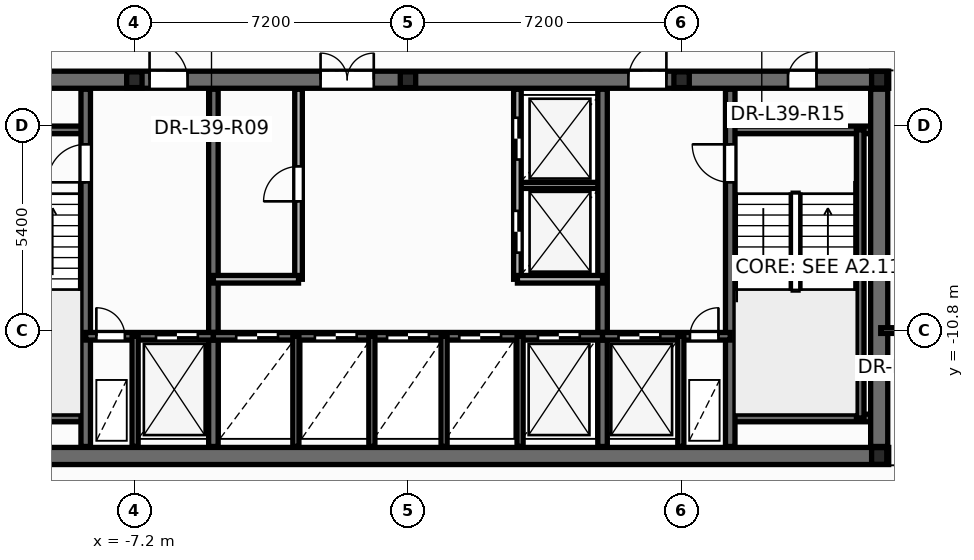
"""IFC4 building model, lengths in metres.
Left out: names, types, materials, properties, quantities, classifications, styles, units other than length and angle.
Written with IfcOpenShell. Run it as: python <this file> out.ifc"""

import sys

from ifc_helpers import new_model, si_unit, direction, frame, frame_2d, origin, origin_2d, place, context, subcontext, project, spatial, rectangle, i_section, extrude, element, fill, save


model = new_model("IFC4")
c1 = context("Model", 3, precision=1e-05, world=origin(), true_north=direction((0.0, 1.0)))
c2 = subcontext(c1, "Body", "Model", "MODEL_VIEW")
j1 = project(units=[si_unit("LENGTHUNIT", "METRE"), si_unit("PLANEANGLEUNIT", "RADIAN")], contexts=[c1])
p1 = place(None, origin())
s1 = spatial("IfcSite", under=j1, at=p1, CompositionType="ELEMENT")
p2 = place(p1, origin())
s2 = spatial("IfcBuilding", under=s1, at=p2, CompositionType="ELEMENT")
p3 = place(p2, frame((0.0, 0.0, 150.9)))
s3 = spatial("IfcBuildingStorey", under=s2, at=p3, CompositionType="ELEMENT", Elevation=150.9)
for number, where, z_axis, x_axis in (
    (1, (12.4, -14.1, 0.0), (0.0, 0.0, 1.0), (1.0, 0.0, 0.0)),
    (2, (12.4, -4.2, 0.0), (0.0, 0.0, 1.0), (1.0, 0.0, 0.0)),
):
    element("IfcColumn", number, at=place(p3, frame(where, z_axis=z_axis, x_axis=x_axis)), inside=s3, PredefinedType="COLUMN", context=c2, shape_type="SweptSolid", body=[
        extrude(i_section(OverallWidth=0.4, OverallDepth=0.44, WebThickness=0.028, FlangeThickness=0.04, at=origin_2d()), origin(), (0.0, 0.0, 1.0), 3.6),
    ])
for number, where, z_axis, x_axis in (
    (3, (-7.2, -4.2, 0.0), (0.0, 0.0, 1.0), (1.0, 0.0, 0.0)),
    (4, (0.0, -4.2, 0.0), (0.0, 0.0, 1.0), (1.0, 0.0, 0.0)),
    (5, (7.2, -4.2, 0.0), (0.0, 0.0, 1.0), (1.0, 0.0, 0.0)),
):
    element("IfcColumn", number, at=place(p3, frame(where, z_axis=z_axis, x_axis=x_axis)), inside=s3, PredefinedType="PILASTER", context=c2, shape_type="SweptSolid", body=[
        extrude(i_section(OverallWidth=0.405, OverallDepth=0.414, WebThickness=0.022, FlangeThickness=0.032, at=origin_2d()), origin(), (0.0, 0.0, 1.0), 3.6),
    ])
p4 = place(p3, frame((2.88, -6.98, 0.0), z_axis=(0.0, 0.0, 1.0), x_axis=(1.0, 0.0, 0.0)))
e6 = element("IfcWall", 6, at=p4, inside=s3, PredefinedType="PARTITIONING", context=c2, shape_type="SweptSolid", body=[
    extrude(rectangle(XDim=2.24, YDim=0.16, at=frame_2d((1.12, 0.0))), origin(), (0.0, 0.0, 1.0), 3.35),
])
p5 = place(p3, frame((-12.65, -14.1, 0.0), z_axis=(0.0, 0.0, 1.0), x_axis=(1.0, 0.0, 0.0)))
e7 = element("IfcWall", 7, at=p5, inside=s3, PredefinedType="SHEAR", context=c2, shape_type="SweptSolid", body=[
    extrude(rectangle(XDim=25.3, YDim=0.45, at=frame_2d((12.65, 0.0))), origin(), (0.0, 0.0, 1.0), 3.6),
])
p6 = place(p3, frame((-12.65, -4.2, 0.0), z_axis=(0.0, 0.0, 1.0), x_axis=(1.0, 0.0, 0.0)))
e8 = element("IfcWall", 8, at=p6, inside=s3, PredefinedType="SHEAR", context=c2, shape_type="SweptSolid", body=[
    extrude(rectangle(XDim=25.3, YDim=0.45, at=frame_2d((12.65, 0.0))), origin(), (0.0, 0.0, 1.0), 3.6),
])
p7 = place(p6, frame((1.85, 0.0, 0.0)))
e9 = element("IfcOpeningElement", 9, at=p7, cuts=e8, PredefinedType="OPENING", context=c2, shape_type="SweptSolid", body=[
    extrude(rectangle(XDim=0.756, YDim=2.054, at=frame_2d((0.375, 1.027))), frame((0.0, 0.235, 0.0), z_axis=(0.0, -1.0, 0.0), x_axis=(1.0, 0.0, 0.0)), (0.0, 0.0, 1.0), 0.47),
])
p8 = place(p6, frame((22.65, 0.0, 0.0)))
e10 = element("IfcOpeningElement", 10, at=p8, cuts=e8, PredefinedType="OPENING", context=c2, shape_type="SweptSolid", body=[
    extrude(rectangle(XDim=0.756, YDim=2.054, at=frame_2d((0.375, 1.027))), frame((0.0, 0.235, 0.0), z_axis=(0.0, -1.0, 0.0), x_axis=(1.0, 0.0, 0.0)), (0.0, 0.0, 1.0), 0.47),
])
p9 = place(p6, frame((5.85, 0.0, 0.0)))
e11 = element("IfcOpeningElement", 11, at=p9, cuts=e8, PredefinedType="OPENING", context=c2, shape_type="SweptSolid", body=[
    extrude(rectangle(XDim=1.006, YDim=2.104, at=frame_2d((0.5, 1.052))), frame((0.0, 0.235, 0.0), z_axis=(0.0, -1.0, 0.0), x_axis=(1.0, 0.0, 0.0)), (0.0, 0.0, 1.0), 0.47),
])
p10 = place(p6, frame((10.35, 0.0, 0.0)))
e12 = element("IfcOpeningElement", 12, at=p10, cuts=e8, PredefinedType="OPENING", context=c2, shape_type="SweptSolid", body=[
    extrude(rectangle(XDim=1.406, YDim=2.154, at=frame_2d((0.7, 1.077))), frame((0.0, 0.235, 0.0), z_axis=(0.0, -1.0, 0.0), x_axis=(1.0, 0.0, 0.0)), (0.0, 0.0, 1.0), 0.47),
])
p11 = place(p6, frame((18.45, 0.0, 0.0)))
e13 = element("IfcOpeningElement", 13, at=p11, cuts=e8, PredefinedType="OPENING", context=c2, shape_type="SweptSolid", body=[
    extrude(rectangle(XDim=1.006, YDim=2.104, at=frame_2d((0.5, 1.052))), frame((0.0, 0.235, 0.0), z_axis=(0.0, -1.0, 0.0), x_axis=(1.0, 0.0, 0.0)), (0.0, 0.0, 1.0), 0.47),
])
for number, where, z_axis, x_axis in (
    (14, (-12.35, -5.52, 0.0), (0.0, 0.0, 1.0), (1.0, 0.0, 0.0)),
    (15, (-12.35, -13.1, 0.0), (0.0, 0.0, 1.0), (1.0, 0.0, 0.0)),
    (16, (8.48, -5.52, 0.0), (0.0, 0.0, 1.0), (1.0, 0.0, 0.0)),
    (17, (8.48, -13.1, 0.0), (0.0, 0.0, 1.0), (1.0, 0.0, 0.0)),
):
    element("IfcWall", number, at=place(p3, frame(where, z_axis=z_axis, x_axis=x_axis)), inside=s3, PredefinedType="SOLIDWALL", context=c2, shape_type="SweptSolid", body=[
        extrude(rectangle(XDim=3.87, YDim=0.2, at=frame_2d((1.935, 0.0))), origin(), (0.0, 0.0, 1.0), 3.6),
    ])
p12 = place(p3, frame((11.9, -13.1, 0.0), z_axis=(0.0, 0.0, 1.0), x_axis=(0.0, 1.0, 0.0)))
e18 = element("IfcWall", 18, at=p12, inside=s3, PredefinedType="SOLIDWALL", context=c2, shape_type="SweptSolid", body=[
    extrude(rectangle(XDim=7.58, YDim=0.2, at=frame_2d((3.79, 0.0))), origin(), (0.0, 0.0, 1.0), 3.6),
])
p13 = place(p3, frame((-8.48, -13.85, 0.0), z_axis=(0.0, 0.0, 1.0), x_axis=(0.0, 1.0, 0.0)))
e19 = element("IfcWall", 19, at=p13, inside=s3, PredefinedType="SHEAR", context=c2, shape_type="SweptSolid", body=[
    extrude(rectangle(XDim=9.4, YDim=0.25, at=frame_2d((4.7, 0.0))), origin(), (0.0, 0.0, 1.0), 3.6),
])
p14 = place(p13, frame((6.95, 0.0, 0.0)))
e20 = element("IfcOpeningElement", 20, at=p14, cuts=e19, PredefinedType="OPENING", context=c2, shape_type="SweptSolid", body=[
    extrude(rectangle(XDim=1.006, YDim=2.104, at=frame_2d((0.5, 1.052))), frame((0.0, 0.135, 0.0), z_axis=(0.0, -1.0, 0.0), x_axis=(1.0, 0.0, 0.0)), (0.0, 0.0, 1.0), 0.27),
])
p15 = place(p3, frame((8.48, -13.85, 0.0), z_axis=(0.0, 0.0, 1.0), x_axis=(0.0, 1.0, 0.0)))
e21 = element("IfcWall", 21, at=p15, inside=s3, PredefinedType="SHEAR", context=c2, shape_type="SweptSolid", body=[
    extrude(rectangle(XDim=9.4, YDim=0.25, at=frame_2d((4.7, 0.0))), origin(), (0.0, 0.0, 1.0), 3.6),
])
p16 = place(p15, frame((6.95, 0.0, 0.0)))
e22 = element("IfcOpeningElement", 22, at=p16, cuts=e21, PredefinedType="OPENING", context=c2, shape_type="SweptSolid", body=[
    extrude(rectangle(XDim=1.006, YDim=2.104, at=frame_2d((0.5, 1.052))), frame((0.0, 0.135, 0.0), z_axis=(0.0, -1.0, 0.0), x_axis=(1.0, 0.0, 0.0)), (0.0, 0.0, 1.0), 0.27),
])
for number, where, z_axis, x_axis in (
    (23, (-5.12, -13.85, 0.0), (0.0, 0.0, 1.0), (0.0, 1.0, 0.0)),
    (24, (5.12, -13.85, 0.0), (0.0, 0.0, 1.0), (0.0, 1.0, 0.0)),
):
    element("IfcWall", number, at=place(p3, frame(where, z_axis=z_axis, x_axis=x_axis)), inside=s3, PredefinedType="SHEAR", context=c2, shape_type="SweptSolid", body=[
        extrude(rectangle(XDim=9.4, YDim=0.25, at=frame_2d((4.7, 0.0))), origin(), (0.0, 0.0, 1.0), 3.6),
    ])
p17 = place(p3, frame((-8.48, -10.95, 0.0), z_axis=(0.0, 0.0, 1.0), x_axis=(1.0, 0.0, 0.0)))
e25 = element("IfcWall", 25, at=p17, inside=s3, PredefinedType="SOLIDWALL", context=c2, shape_type="SweptSolid", body=[
    extrude(rectangle(XDim=3.36, YDim=0.2, at=frame_2d((1.68, 0.0))), origin(), (0.0, 0.0, 1.0), 3.6),
])
p18 = place(p17, frame((0.28, 0.0, 0.0)))
e26 = element("IfcOpeningElement", 26, at=p18, cuts=e25, PredefinedType="OPENING", context=c2, shape_type="SweptSolid", body=[
    extrude(rectangle(XDim=0.756, YDim=2.054, at=frame_2d((0.375, 1.027))), frame((0.0, 0.11, 0.0), z_axis=(0.0, -1.0, 0.0), x_axis=(1.0, 0.0, 0.0)), (0.0, 0.0, 1.0), 0.22),
])
p19 = place(p17, frame((1.85, 0.0, 0.0)))
e27 = element("IfcOpeningElement", 27, at=p19, cuts=e25, PredefinedType="OPENING", context=c2, shape_type="SweptSolid", body=[
    extrude(rectangle(XDim=1.106, YDim=2.104, at=frame_2d((0.55, 1.052))), frame((0.0, 0.11, 0.0), z_axis=(0.0, -1.0, 0.0), x_axis=(1.0, 0.0, 0.0)), (0.0, 0.0, 1.0), 0.22),
])
p20 = place(p3, frame((-5.12, -10.95, 0.0), z_axis=(0.0, 0.0, 1.0), x_axis=(1.0, 0.0, 0.0)))
e28 = element("IfcWall", 28, at=p20, inside=s3, PredefinedType="SOLIDWALL", context=c2, shape_type="SweptSolid", body=[
    extrude(rectangle(XDim=10.24, YDim=0.2, at=frame_2d((5.12, 0.0))), origin(), (0.0, 0.0, 1.0), 3.6),
])
p21 = place(p20, frame((0.6, 0.0, 0.0)))
e29 = element("IfcOpeningElement", 29, at=p21, cuts=e28, PredefinedType="OPENING", context=c2, shape_type="SweptSolid", body=[
    extrude(rectangle(XDim=1.106, YDim=2.104, at=frame_2d((0.55, 1.052))), frame((0.0, 0.11, 0.0), z_axis=(0.0, -1.0, 0.0), x_axis=(1.0, 0.0, 0.0)), (0.0, 0.0, 1.0), 0.22),
])
p22 = place(p20, frame((2.67, 0.0, 0.0)))
e30 = element("IfcOpeningElement", 30, at=p22, cuts=e28, PredefinedType="OPENING", context=c2, shape_type="SweptSolid", body=[
    extrude(rectangle(XDim=1.106, YDim=2.104, at=frame_2d((0.55, 1.052))), frame((0.0, 0.11, 0.0), z_axis=(0.0, -1.0, 0.0), x_axis=(1.0, 0.0, 0.0)), (0.0, 0.0, 1.0), 0.22),
])
p23 = place(p20, frame((4.57, 0.0, 0.0)))
e31 = element("IfcOpeningElement", 31, at=p23, cuts=e28, PredefinedType="OPENING", context=c2, shape_type="SweptSolid", body=[
    extrude(rectangle(XDim=1.106, YDim=2.104, at=frame_2d((0.55, 1.052))), frame((0.0, 0.11, 0.0), z_axis=(0.0, -1.0, 0.0), x_axis=(1.0, 0.0, 0.0)), (0.0, 0.0, 1.0), 0.22),
])
p24 = place(p20, frame((6.47, 0.0, 0.0)))
e32 = element("IfcOpeningElement", 32, at=p24, cuts=e28, PredefinedType="OPENING", context=c2, shape_type="SweptSolid", body=[
    extrude(rectangle(XDim=1.106, YDim=2.104, at=frame_2d((0.55, 1.052))), frame((0.0, 0.11, 0.0), z_axis=(0.0, -1.0, 0.0), x_axis=(1.0, 0.0, 0.0)), (0.0, 0.0, 1.0), 0.22),
])
p25 = place(p20, frame((8.54, 0.0, 0.0)))
e33 = element("IfcOpeningElement", 33, at=p25, cuts=e28, PredefinedType="OPENING", context=c2, shape_type="SweptSolid", body=[
    extrude(rectangle(XDim=1.106, YDim=2.104, at=frame_2d((0.55, 1.052))), frame((0.0, 0.11, 0.0), z_axis=(0.0, -1.0, 0.0), x_axis=(1.0, 0.0, 0.0)), (0.0, 0.0, 1.0), 0.22),
])
p26 = place(p3, frame((5.12, -10.95, 0.0), z_axis=(0.0, 0.0, 1.0), x_axis=(1.0, 0.0, 0.0)))
e34 = element("IfcWall", 34, at=p26, inside=s3, PredefinedType="SOLIDWALL", context=c2, shape_type="SweptSolid", body=[
    extrude(rectangle(XDim=3.36, YDim=0.2, at=frame_2d((1.68, 0.0))), origin(), (0.0, 0.0, 1.0), 3.6),
])
p27 = place(p26, frame((0.42, 0.0, 0.0)))
e35 = element("IfcOpeningElement", 35, at=p27, cuts=e34, PredefinedType="OPENING", context=c2, shape_type="SweptSolid", body=[
    extrude(rectangle(XDim=1.106, YDim=2.104, at=frame_2d((0.55, 1.052))), frame((0.0, 0.11, 0.0), z_axis=(0.0, -1.0, 0.0), x_axis=(1.0, 0.0, 0.0)), (0.0, 0.0, 1.0), 0.22),
])
p28 = place(p26, frame((2.3, 0.0, 0.0)))
e36 = element("IfcOpeningElement", 36, at=p28, cuts=e34, PredefinedType="OPENING", context=c2, shape_type="SweptSolid", body=[
    extrude(rectangle(XDim=0.756, YDim=2.054, at=frame_2d((0.375, 1.027))), frame((0.0, 0.11, 0.0), z_axis=(0.0, -1.0, 0.0), x_axis=(1.0, 0.0, 0.0)), (0.0, 0.0, 1.0), 0.22),
])
for number, where, z_axis, x_axis in (
    (37, (-7.18, -13.85, 0.0), (0.0, 0.0, 1.0), (0.0, 1.0, 0.0)),
    (38, (7.18, -13.85, 0.0), (0.0, 0.0, 1.0), (0.0, 1.0, 0.0)),
    (39, (-2.95, -13.85, 0.0), (0.0, 0.0, 1.0), (0.0, 1.0, 0.0)),
    (40, (2.95, -13.85, 0.0), (0.0, 0.0, 1.0), (0.0, 1.0, 0.0)),
):
    element("IfcWall", number, at=place(p3, frame(where, z_axis=z_axis, x_axis=x_axis)), inside=s3, PredefinedType="PARTITIONING", context=c2, shape_type="SweptSolid", body=[
        extrude(rectangle(XDim=2.9, YDim=0.16, at=frame_2d((1.45, 0.0))), origin(), (0.0, 0.0, 1.0), 2.475),
    ])
p29 = place(p3, frame((12.4, -13.85, 0.0), z_axis=(0.0, 0.0, 1.0), x_axis=(0.0, 1.0, 0.0)))
e41 = element("IfcWall", 41, at=p29, inside=s3, PredefinedType="SHEAR", context=c2, shape_type="SweptSolid", body=[
    extrude(rectangle(XDim=9.4, YDim=0.45, at=frame_2d((4.7, 0.0))), origin(), (0.0, 0.0, 1.0), 3.6),
])
p30 = place(p3, frame((-2.88, -9.45, 0.0), z_axis=(0.0, 0.0, 1.0), x_axis=(0.0, 1.0, 0.0)))
e42 = element("IfcWall", 42, at=p30, inside=s3, PredefinedType="SOLIDWALL", context=c2, shape_type="SweptSolid", body=[
    extrude(rectangle(XDim=5.0, YDim=0.2, at=frame_2d((2.5, 0.0))), origin(), (0.0, 0.0, 1.0), 3.35),
])
p31 = place(p30, frame((2.05, 0.0, 0.0)))
e43 = element("IfcOpeningElement", 43, at=p31, cuts=e42, PredefinedType="OPENING", context=c2, shape_type="SweptSolid", body=[
    extrude(rectangle(XDim=0.926, YDim=2.104, at=frame_2d((0.46, 1.052))), frame((0.0, 0.11, 0.0), z_axis=(0.0, -1.0, 0.0), x_axis=(1.0, 0.0, 0.0)), (0.0, 0.0, 1.0), 0.22),
])
p32 = place(p3, frame((-5.12, -9.45, 0.0), z_axis=(0.0, 0.0, 1.0), x_axis=(1.0, 0.0, 0.0)))
e44 = element("IfcWall", 44, at=p32, inside=s3, PredefinedType="SOLIDWALL", context=c2, shape_type="SweptSolid", body=[
    extrude(rectangle(XDim=2.24, YDim=0.2, at=frame_2d((1.12, 0.0))), origin(), (0.0, 0.0, 1.0), 3.35),
])
p33 = place(p3, frame((2.88, -9.45, 0.0), z_axis=(0.0, 0.0, 1.0), x_axis=(0.0, 1.0, 0.0)))
e45 = element("IfcWall", 45, at=p33, inside=s3, PredefinedType="SOLIDWALL", context=c2, shape_type="SweptSolid", body=[
    extrude(rectangle(XDim=5.0, YDim=0.2, at=frame_2d((2.5, 0.0))), origin(), (0.0, 0.0, 1.0), 3.35),
])
p34 = place(p33, frame((0.7, 0.0, 0.0)))
e46 = element("IfcOpeningElement", 46, at=p34, cuts=e45, PredefinedType="OPENING", context=c2, shape_type="SweptSolid", body=[
    extrude(rectangle(XDim=1.106, YDim=2.104, at=frame_2d((0.55, 1.052))), frame((0.0, 0.11, 0.0), z_axis=(0.0, -1.0, 0.0), x_axis=(1.0, 0.0, 0.0)), (0.0, 0.0, 1.0), 0.22),
])
p35 = place(p33, frame((3.15, 0.0, 0.0)))
e47 = element("IfcOpeningElement", 47, at=p35, cuts=e45, PredefinedType="OPENING", context=c2, shape_type="SweptSolid", body=[
    extrude(rectangle(XDim=1.106, YDim=2.104, at=frame_2d((0.55, 1.052))), frame((0.0, 0.11, 0.0), z_axis=(0.0, -1.0, 0.0), x_axis=(1.0, 0.0, 0.0)), (0.0, 0.0, 1.0), 0.22),
])
p36 = place(p3, frame((2.88, -9.45, 0.0), z_axis=(0.0, 0.0, 1.0), x_axis=(1.0, 0.0, 0.0)))
e48 = element("IfcWall", 48, at=p36, inside=s3, PredefinedType="SOLIDWALL", context=c2, shape_type="SweptSolid", body=[
    extrude(rectangle(XDim=2.24, YDim=0.2, at=frame_2d((1.12, 0.0))), origin(), (0.0, 0.0, 1.0), 3.35),
])
for number, where, z_axis, x_axis in (
    (49, (-0.95, -13.85, 0.0), (0.0, 0.0, 1.0), (0.0, 1.0, 0.0)),
    (50, (0.95, -13.85, 0.0), (0.0, 0.0, 1.0), (0.0, 1.0, 0.0)),
):
    element("IfcWall", number, at=place(p3, frame(where, z_axis=z_axis, x_axis=x_axis)), inside=s3, PredefinedType="PARTITIONING", context=c2, shape_type="SweptSolid", body=[
        extrude(rectangle(XDim=2.9, YDim=0.16, at=frame_2d((1.45, 0.0))), origin(), (0.0, 0.0, 1.0), 2.475),
    ])
p37 = place(p3, frame((12.44, -10.8, 0.0), z_axis=(0.0, 0.0, 1.0), x_axis=(1.0, 0.0, 0.0)))
e51 = element("IfcWall", 51, at=p37, inside=s3, PredefinedType="PARTITIONING", context=c2, shape_type="SweptSolid", body=[
    extrude(rectangle(XDim=2.2, YDim=0.15, at=frame_2d((1.1, 0.0))), origin(), (0.0, 0.0, 1.0), 2.792),
])
p38 = place(p37, frame((0.456, 0.0, 0.0)))
e52 = element("IfcOpeningElement", 52, at=p38, cuts=e51, PredefinedType="OPENING", context=c2, shape_type="SweptSolid", body=[
    extrude(rectangle(XDim=0.906, YDim=2.104, at=frame_2d((0.45, 1.052))), frame((0.0, 0.085, 0.0), z_axis=(0.0, -1.0, 0.0), x_axis=(1.0, 0.0, 0.0)), (0.0, 0.0, 1.0), 0.17),
])
p39 = place(p31, origin())
e53 = element("IfcDoor", 53, at=p39, inside=s3, OperationType="SINGLE_SWING_LEFT", PredefinedType="DOOR", context=c2, shape_type="SweptSolid", body=[
    extrude(rectangle(XDim=0.92, YDim=2.1, at=frame_2d((0.46, 1.05))), frame((0.0, 0.025, 0.0), z_axis=(0.0, -1.0, 0.0), x_axis=(1.0, 0.0, 0.0)), (0.0, 0.0, 1.0), 0.05),
])
fill(e43, e53)
p40 = place(p34, origin())
e54 = element("IfcDoor", 54, at=p40, inside=s3, OperationType="DOUBLE_DOOR_SLIDING", PredefinedType="DOOR", context=c2, shape_type="SweptSolid", body=[
    extrude(rectangle(XDim=1.1, YDim=2.1, at=frame_2d((0.55, 1.05))), frame((0.0, 0.025, 0.0), z_axis=(0.0, -1.0, 0.0), x_axis=(1.0, 0.0, 0.0)), (0.0, 0.0, 1.0), 0.05),
])
fill(e46, e54)
p41 = place(p35, origin())
e55 = element("IfcDoor", 55, at=p41, inside=s3, OperationType="DOUBLE_DOOR_SLIDING", PredefinedType="DOOR", context=c2, shape_type="SweptSolid", body=[
    extrude(rectangle(XDim=1.1, YDim=2.1, at=frame_2d((0.55, 1.05))), frame((0.0, 0.025, 0.0), z_axis=(0.0, -1.0, 0.0), x_axis=(1.0, 0.0, 0.0)), (0.0, 0.0, 1.0), 0.05),
])
fill(e47, e55)
p42 = place(p14, origin())
e56 = element("IfcDoor", 56, at=p42, inside=s3, OperationType="SINGLE_SWING_LEFT", PredefinedType="DOOR", context=c2, shape_type="SweptSolid", body=[
    extrude(rectangle(XDim=1.0, YDim=2.1, at=frame_2d((0.5, 1.05))), frame((0.0, 0.025, 0.0), z_axis=(0.0, -1.0, 0.0), x_axis=(1.0, 0.0, 0.0)), (0.0, 0.0, 1.0), 0.05),
])
fill(e20, e56)
p43 = place(p16, origin())
e57 = element("IfcDoor", 57, at=p43, inside=s3, OperationType="SINGLE_SWING_RIGHT", PredefinedType="DOOR", context=c2, shape_type="SweptSolid", body=[
    extrude(rectangle(XDim=1.0, YDim=2.1, at=frame_2d((0.5, 1.05))), frame((0.0, 0.025, 0.0), z_axis=(0.0, -1.0, 0.0), x_axis=(1.0, 0.0, 0.0)), (0.0, 0.0, 1.0), 0.05),
])
fill(e22, e57)
p44 = place(p18, origin())
e58 = element("IfcDoor", 58, at=p44, inside=s3, OperationType="SINGLE_SWING_LEFT", PredefinedType="DOOR", context=c2, shape_type="SweptSolid", body=[
    extrude(rectangle(XDim=0.75, YDim=2.05, at=frame_2d((0.375, 1.025))), frame((0.0, 0.025, 0.0), z_axis=(0.0, -1.0, 0.0), x_axis=(1.0, 0.0, 0.0)), (0.0, 0.0, 1.0), 0.05),
])
fill(e26, e58)
p45 = place(p19, origin())
e59 = element("IfcDoor", 59, at=p45, inside=s3, OperationType="DOUBLE_DOOR_SLIDING", PredefinedType="DOOR", context=c2, shape_type="SweptSolid", body=[
    extrude(rectangle(XDim=1.1, YDim=2.1, at=frame_2d((0.55, 1.05))), frame((0.0, 0.025, 0.0), z_axis=(0.0, -1.0, 0.0), x_axis=(1.0, 0.0, 0.0)), (0.0, 0.0, 1.0), 0.05),
])
fill(e27, e59)
p46 = place(p27, origin())
e60 = element("IfcDoor", 60, at=p46, inside=s3, OperationType="DOUBLE_DOOR_SLIDING", PredefinedType="DOOR", context=c2, shape_type="SweptSolid", body=[
    extrude(rectangle(XDim=1.1, YDim=2.1, at=frame_2d((0.55, 1.05))), frame((0.0, 0.025, 0.0), z_axis=(0.0, -1.0, 0.0), x_axis=(1.0, 0.0, 0.0)), (0.0, 0.0, 1.0), 0.05),
])
fill(e35, e60)
p47 = place(p28, origin())
e61 = element("IfcDoor", 61, at=p47, inside=s3, OperationType="SINGLE_SWING_RIGHT", PredefinedType="DOOR", context=c2, shape_type="SweptSolid", body=[
    extrude(rectangle(XDim=0.75, YDim=2.05, at=frame_2d((0.375, 1.025))), frame((0.0, 0.025, 0.0), z_axis=(0.0, -1.0, 0.0), x_axis=(1.0, 0.0, 0.0)), (0.0, 0.0, 1.0), 0.05),
])
fill(e36, e61)
p48 = place(p21, origin())
e62 = element("IfcDoor", 62, at=p48, inside=s3, OperationType="DOUBLE_DOOR_SLIDING", PredefinedType="DOOR", context=c2, shape_type="SweptSolid", body=[
    extrude(rectangle(XDim=1.1, YDim=2.1, at=frame_2d((0.55, 1.05))), frame((0.0, 0.025, 0.0), z_axis=(0.0, -1.0, 0.0), x_axis=(1.0, 0.0, 0.0)), (0.0, 0.0, 1.0), 0.05),
])
fill(e29, e62)
p49 = place(p22, origin())
e63 = element("IfcDoor", 63, at=p49, inside=s3, OperationType="DOUBLE_DOOR_SLIDING", PredefinedType="DOOR", context=c2, shape_type="SweptSolid", body=[
    extrude(rectangle(XDim=1.1, YDim=2.1, at=frame_2d((0.55, 1.05))), frame((0.0, 0.025, 0.0), z_axis=(0.0, -1.0, 0.0), x_axis=(1.0, 0.0, 0.0)), (0.0, 0.0, 1.0), 0.05),
])
fill(e30, e63)
p50 = place(p23, origin())
e64 = element("IfcDoor", 64, at=p50, inside=s3, OperationType="DOUBLE_DOOR_SLIDING", PredefinedType="DOOR", context=c2, shape_type="SweptSolid", body=[
    extrude(rectangle(XDim=1.1, YDim=2.1, at=frame_2d((0.55, 1.05))), frame((0.0, 0.025, 0.0), z_axis=(0.0, -1.0, 0.0), x_axis=(1.0, 0.0, 0.0)), (0.0, 0.0, 1.0), 0.05),
])
fill(e31, e64)
p51 = place(p24, origin())
e65 = element("IfcDoor", 65, at=p51, inside=s3, OperationType="DOUBLE_DOOR_SLIDING", PredefinedType="DOOR", context=c2, shape_type="SweptSolid", body=[
    extrude(rectangle(XDim=1.1, YDim=2.1, at=frame_2d((0.55, 1.05))), frame((0.0, 0.025, 0.0), z_axis=(0.0, -1.0, 0.0), x_axis=(1.0, 0.0, 0.0)), (0.0, 0.0, 1.0), 0.05),
])
fill(e32, e65)
p52 = place(p25, origin())
e66 = element("IfcDoor", 66, at=p52, inside=s3, OperationType="DOUBLE_DOOR_SLIDING", PredefinedType="DOOR", context=c2, shape_type="SweptSolid", body=[
    extrude(rectangle(XDim=1.1, YDim=2.1, at=frame_2d((0.55, 1.05))), frame((0.0, 0.025, 0.0), z_axis=(0.0, -1.0, 0.0), x_axis=(1.0, 0.0, 0.0)), (0.0, 0.0, 1.0), 0.05),
])
fill(e33, e66)
p53 = place(p8, origin())
e67 = element("IfcDoor", 67, at=p53, inside=s3, OperationType="SINGLE_SWING_RIGHT", PredefinedType="DOOR", context=c2, shape_type="SweptSolid", body=[
    extrude(rectangle(XDim=0.75, YDim=2.05, at=frame_2d((0.375, 1.025))), frame((0.0, 0.025, 0.0), z_axis=(0.0, -1.0, 0.0), x_axis=(1.0, 0.0, 0.0)), (0.0, 0.0, 1.0), 0.05),
])
fill(e10, e67)
p54 = place(p9, origin())
e68 = element("IfcDoor", 68, at=p54, inside=s3, OperationType="SINGLE_SWING_LEFT", PredefinedType="DOOR", context=c2, shape_type="SweptSolid", body=[
    extrude(rectangle(XDim=1.0, YDim=2.1, at=frame_2d((0.5, 1.05))), frame((0.0, 0.025, 0.0), z_axis=(0.0, -1.0, 0.0), x_axis=(1.0, 0.0, 0.0)), (0.0, 0.0, 1.0), 0.05),
])
fill(e11, e68)
p55 = place(p10, origin())
e69 = element("IfcDoor", 69, at=p55, inside=s3, OperationType="DOUBLE_DOOR_SINGLE_SWING", PredefinedType="DOOR", context=c2, shape_type="SweptSolid", body=[
    extrude(rectangle(XDim=1.4, YDim=2.15, at=frame_2d((0.7, 1.075))), frame((0.0, 0.025, 0.0), z_axis=(0.0, -1.0, 0.0), x_axis=(1.0, 0.0, 0.0)), (0.0, 0.0, 1.0), 0.05),
])
fill(e12, e69)
p56 = place(p11, origin())
e70 = element("IfcDoor", 70, at=p56, inside=s3, OperationType="SINGLE_SWING_RIGHT", PredefinedType="DOOR", context=c2, shape_type="SweptSolid", body=[
    extrude(rectangle(XDim=1.0, YDim=2.1, at=frame_2d((0.5, 1.05))), frame((0.0, 0.025, 0.0), z_axis=(0.0, -1.0, 0.0), x_axis=(1.0, 0.0, 0.0)), (0.0, 0.0, 1.0), 0.05),
])
fill(e13, e70)
save(model, sys.argv[1])
